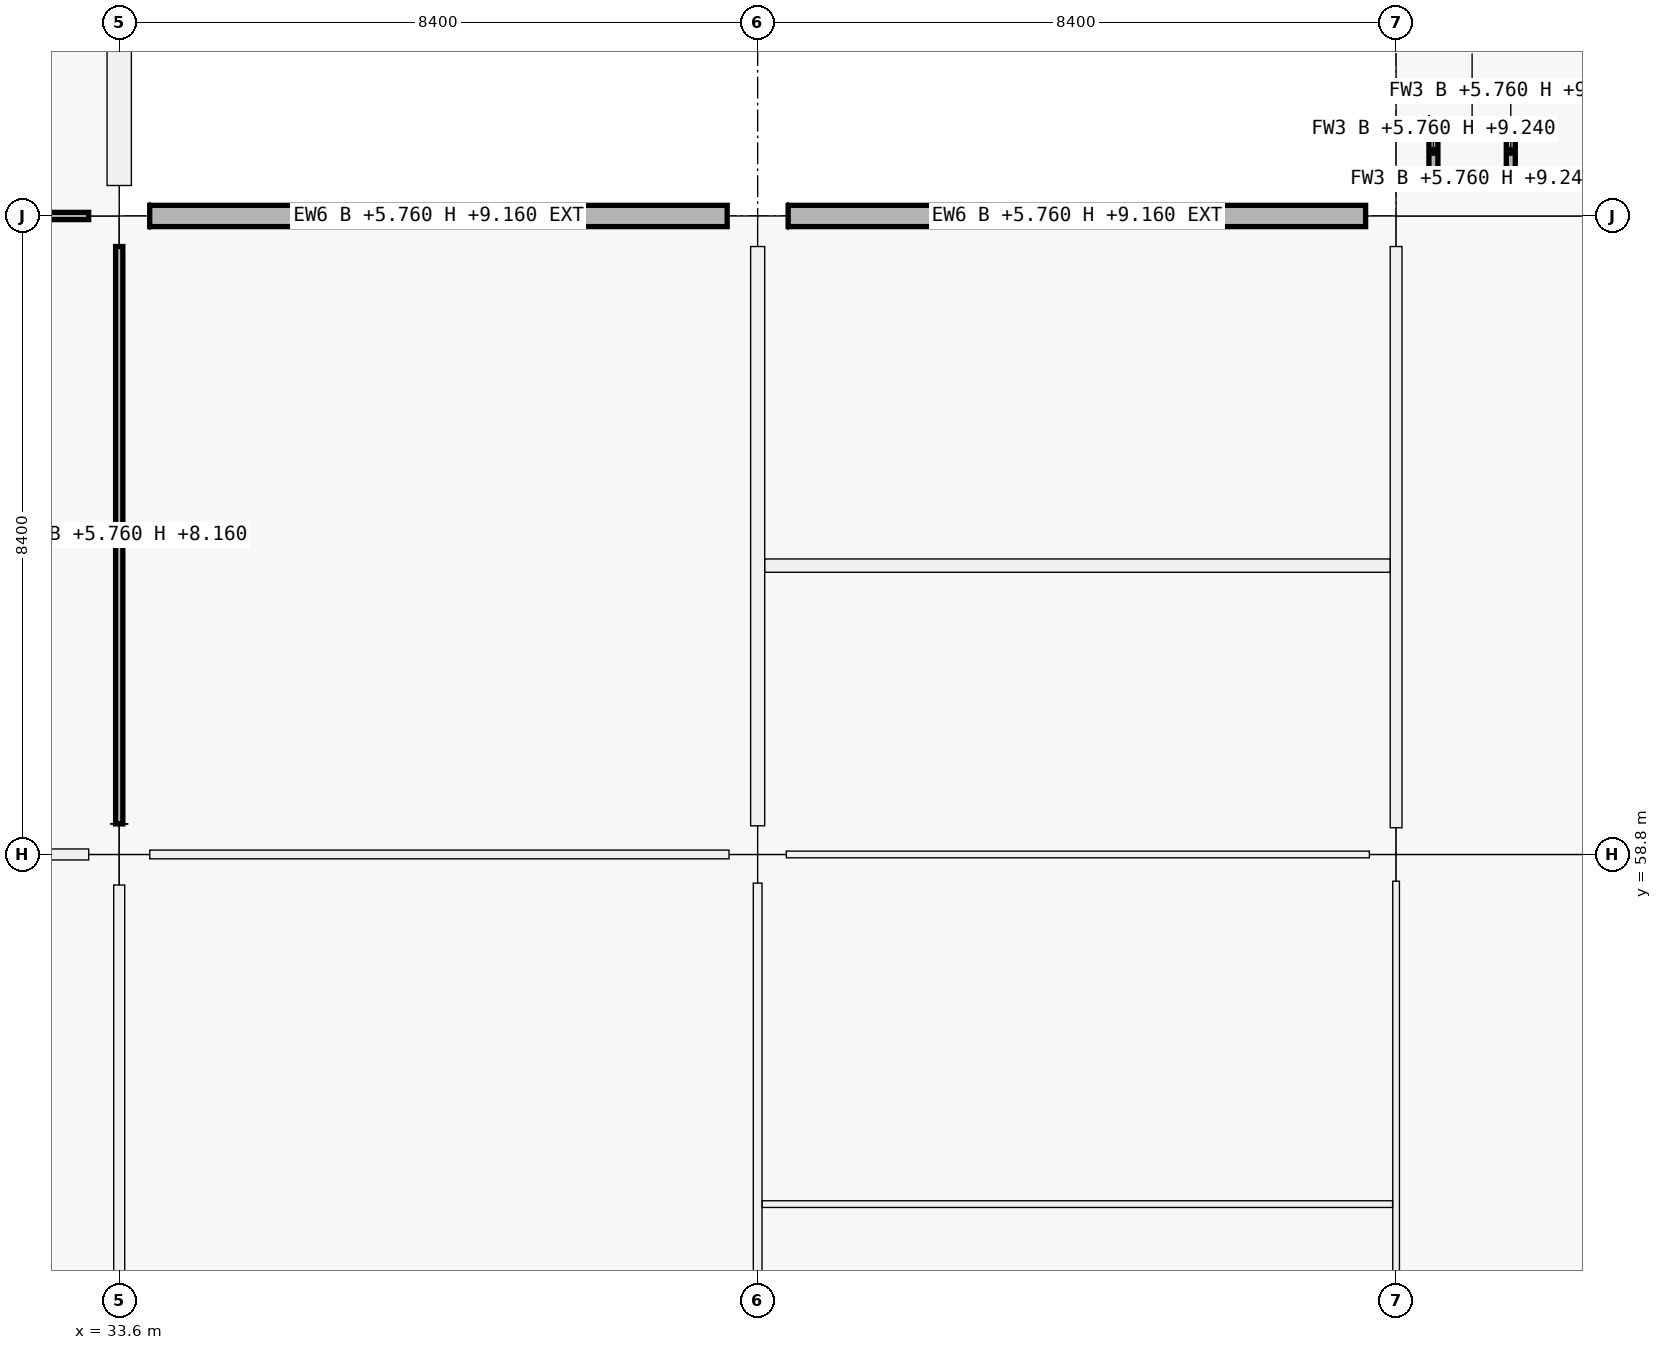
"""IFC4 building model, lengths in metres.
Left out: names, types, materials, properties, quantities, classifications, styles, units other than length and angle.
Written with IfcOpenShell. Run it as: python <this file> out.ifc"""

import sys

from ifc_helpers import new_model, si_unit, direction, frame, frame_2d, origin, origin_2d, place, context, subcontext, project, spatial, rectangle, extrude, element, fill, save


model = new_model("IFC4")
c1 = context("Model", 3, precision=1e-05, world=origin(), true_north=direction((0.0, 1.0)))
c2 = subcontext(c1, "Body", "Model", "MODEL_VIEW")
j1 = project(units=[si_unit("LENGTHUNIT", "METRE"), si_unit("PLANEANGLEUNIT", "RADIAN")], contexts=[c1])
p1 = place(None, origin())
s1 = spatial("IfcSite", under=j1, at=p1, CompositionType="ELEMENT")
p2 = place(p1, origin())
s2 = spatial("IfcBuilding", under=s1, at=p2, CompositionType="ELEMENT")
p3 = place(p2, frame((0.0, 0.0, 5.76)))
s3 = spatial("IfcBuildingStorey", under=s2, at=p3, CompositionType="ELEMENT", Elevation=5.76)
for number, where, z_axis, x_axis in (
    (1, (33.6, 58.8, 0.0), (0.0, 0.0, 1.0), (1.0, 0.0, 0.0)),
    (2, (33.6, 67.2, 0.0), (0.0, 0.0, 1.0), (1.0, 0.0, 0.0)),
):
    element("IfcColumn", number, at=place(p3, frame(where, z_axis=z_axis, x_axis=x_axis)), inside=s3, PredefinedType="COLUMN", context=c2, shape_type="SweptSolid", body=[
        extrude(rectangle(XDim=0.8, YDim=0.8, at=origin_2d()), origin(), (0.0, 0.0, 1.0), 4.5),
    ])
p4 = place(p3, frame((42.0, 58.8, 0.0), z_axis=(0.0, 0.0, 1.0), x_axis=(1.0, 0.0, 0.0)))
e3 = element("IfcColumn", 3, at=p4, inside=s3, PredefinedType="COLUMN", context=c2, shape_type="SweptSolid", body=[
    extrude(rectangle(XDim=0.75, YDim=0.75, at=origin_2d()), origin(), (0.0, 0.0, 1.0), 4.5),
])
p5 = place(p3, frame((42.0, 67.2, 0.0), z_axis=(0.0, 0.0, 1.0), x_axis=(1.0, 0.0, 0.0)))
e4 = element("IfcColumn", 4, at=p5, inside=s3, PredefinedType="COLUMN", context=c2, shape_type="SweptSolid", body=[
    extrude(rectangle(XDim=0.8, YDim=0.8, at=origin_2d()), origin(), (0.0, 0.0, 1.0), 4.5),
])
p6 = place(p3, frame((50.4, 58.8, 0.0), z_axis=(0.0, 0.0, 1.0), x_axis=(1.0, 0.0, 0.0)))
e5 = element("IfcColumn", 5, at=p6, inside=s3, PredefinedType="COLUMN", context=c2, shape_type="SweptSolid", body=[
    extrude(rectangle(XDim=0.7, YDim=0.7, at=origin_2d()), origin(), (0.0, 0.0, 1.0), 4.5),
])
p7 = place(p3, frame((50.4, 67.2, 0.0), z_axis=(0.0, 0.0, 1.0), x_axis=(1.0, 0.0, 0.0)))
e6 = element("IfcColumn", 6, at=p7, inside=s3, PredefinedType="COLUMN", context=c2, shape_type="SweptSolid", body=[
    extrude(rectangle(XDim=0.8, YDim=0.8, at=origin_2d()), origin(), (0.0, 0.0, 1.0), 4.5),
])
p8 = place(p3, frame((33.6, 75.199, 0.0), z_axis=(0.0, 0.0, 1.0), x_axis=(0.0, -1.0, 0.0)))
e7 = element("IfcWall", 7, at=p8, inside=s3, PredefinedType="SOLIDWALL", context=c2, shape_type="SweptSolid", body=[
    extrude(rectangle(XDim=7.598, YDim=0.32, at=frame_2d((3.799, 0.0))), origin(), (0.0, 0.0, 1.0), 3.4),
])
p9 = place(p8, frame((2.524, 0.0, 0.9)))
e8 = element("IfcOpeningElement", 8, at=p9, cuts=e7, PredefinedType="OPENING", context=c2, shape_type="SweptSolid", body=[
    extrude(rectangle(XDim=2.55, YDim=1.95, at=frame_2d((1.275, 0.975))), frame((0.0, 0.16, 0.0), z_axis=(0.0, -1.0, 0.0), x_axis=(1.0, 0.0, 0.0)), (0.0, 0.0, 1.0), 0.32),
])
p10 = place(p3, frame((34.001, 67.2, 0.0), z_axis=(0.0, 0.0, 1.0), x_axis=(1.0, 0.0, 0.0)))
e9 = element("IfcWall", 9, at=p10, inside=s3, PredefinedType="SOLIDWALL", context=c2, shape_type="SweptSolid", body=[
    extrude(rectangle(XDim=7.598, YDim=0.28, at=frame_2d((3.799, 0.0))), origin(), (0.0, 0.0, 1.0), 3.4),
])
p11 = place(p10, frame((3.149, 0.0, 0.9)))
e10 = element("IfcOpeningElement", 10, at=p11, cuts=e9, PredefinedType="OPENING", context=c2, shape_type="SweptSolid", body=[
    extrude(rectangle(XDim=1.3, YDim=1.95, at=frame_2d((0.65, 0.975))), frame((0.0, 0.14, 0.0), z_axis=(0.0, -1.0, 0.0), x_axis=(1.0, 0.0, 0.0)), (0.0, 0.0, 1.0), 0.28),
])
p12 = place(p3, frame((42.401, 67.2, 0.0), z_axis=(0.0, 0.0, 1.0), x_axis=(1.0, 0.0, 0.0)))
e11 = element("IfcWall", 11, at=p12, inside=s3, PredefinedType="SOLIDWALL", context=c2, shape_type="SweptSolid", body=[
    extrude(rectangle(XDim=7.598, YDim=0.28, at=frame_2d((3.799, 0.0))), origin(), (0.0, 0.0, 1.0), 3.4),
])
p13 = place(p12, frame((3.024, 0.0, 0.9)))
e12 = element("IfcOpeningElement", 12, at=p13, cuts=e11, PredefinedType="OPENING", context=c2, shape_type="SweptSolid", body=[
    extrude(rectangle(XDim=1.55, YDim=1.6, at=frame_2d((0.775, 0.8))), frame((0.0, 0.14, 0.0), z_axis=(0.0, -1.0, 0.0), x_axis=(1.0, 0.0, 0.0)), (0.0, 0.0, 1.0), 0.28),
])
for number, where, z_axis, x_axis in (
    (13, (50.832, 67.691, 0.0), (0.0, 0.0, 1.0), (1.0, 0.0, 0.0)),
    (14, (50.832, 68.409, 0.0), (0.0, 0.0, 1.0), (1.0, 0.0, 0.0)),
):
    element("IfcWall", number, at=place(p3, frame(where, z_axis=z_axis, x_axis=x_axis)), inside=s3, PredefinedType="PARTITIONING", context=c2, shape_type="SweptSolid", body=[
        extrude(rectangle(XDim=1.136, YDim=0.118, at=frame_2d((0.568, 0.0))), origin(), (0.0, 0.0, 1.0), 3.48),
    ])
for number, where, z_axis, x_axis in (
    (15, (50.891, 67.75, 0.0), (0.0, 0.0, 1.0), (0.0, 1.0, 0.0)),
    (16, (51.909, 67.75, 0.0), (0.0, 0.0, 1.0), (0.0, 1.0, 0.0)),
):
    element("IfcWall", number, at=place(p3, frame(where, z_axis=z_axis, x_axis=x_axis)), inside=s3, PredefinedType="PARTITIONING", context=c2, shape_type="SweptSolid", body=[
        extrude(rectangle(XDim=0.6, YDim=0.118, at=frame_2d((0.3, 0.0))), origin(), (0.0, 0.0, 1.0), 3.48),
    ])
p14 = place(p3, frame((25.602, 58.8, 0.0), z_axis=(0.0, 0.0, 1.0), x_axis=(1.0, 0.0, 0.0)))
e17 = element("IfcWall", 17, at=p14, inside=s3, PredefinedType="PARTITIONING", context=c2, shape_type="SweptSolid", body=[
    extrude(rectangle(XDim=7.596, YDim=0.145, at=frame_2d((3.798, 0.0))), origin(), (0.0, 0.0, 1.0), 2.4),
])
p15 = place(p14, frame((3.268, 0.0, 0.0)))
e18 = element("IfcOpeningElement", 18, at=p15, cuts=e17, PredefinedType="OPENING", context=c2, shape_type="SweptSolid", body=[
    extrude(rectangle(XDim=1.06, YDim=2.22, at=frame_2d((0.53, 1.11))), frame((0.0, 0.073, 0.0), z_axis=(0.0, -1.0, 0.0), x_axis=(1.0, 0.0, 0.0)), (0.0, 0.0, 1.0), 0.145),
])
p16 = place(p3, frame((25.602, 67.2, 0.0), z_axis=(0.0, 0.0, 1.0), x_axis=(1.0, 0.0, 0.0)))
e19 = element("IfcWall", 19, at=p16, inside=s3, PredefinedType="PARTITIONING", context=c2, shape_type="SweptSolid", body=[
    extrude(rectangle(XDim=7.596, YDim=0.095, at=frame_2d((3.798, 0.0))), origin(), (0.0, 0.0, 1.0), 2.4),
])
p17 = place(p16, frame((3.258, 0.0, 0.0)))
e20 = element("IfcOpeningElement", 20, at=p17, cuts=e19, PredefinedType="OPENING", context=c2, shape_type="SweptSolid", body=[
    extrude(rectangle(XDim=1.08, YDim=2.22, at=frame_2d((0.54, 1.11))), frame((0.0, 0.047, 0.0), z_axis=(0.0, -1.0, 0.0), x_axis=(1.0, 0.0, 0.0)), (0.0, 0.0, 1.0), 0.095),
])
p18 = place(p3, frame((34.002, 58.8, 0.0), z_axis=(0.0, 0.0, 1.0), x_axis=(1.0, 0.0, 0.0)))
e21 = element("IfcWall", 21, at=p18, inside=s3, PredefinedType="PARTITIONING", context=c2, shape_type="SweptSolid", body=[
    extrude(rectangle(XDim=7.621, YDim=0.115, at=frame_2d((3.811, 0.0))), origin(), (0.0, 0.0, 1.0), 2.4),
])
p19 = place(p18, frame((3.28, 0.0, 0.0)))
e22 = element("IfcOpeningElement", 22, at=p19, cuts=e21, PredefinedType="OPENING", context=c2, shape_type="SweptSolid", body=[
    extrude(rectangle(XDim=1.06, YDim=2.22, at=frame_2d((0.53, 1.11))), frame((0.0, 0.058, 0.0), z_axis=(0.0, -1.0, 0.0), x_axis=(1.0, 0.0, 0.0)), (0.0, 0.0, 1.0), 0.115),
])
p20 = place(p3, frame((42.377, 58.8, 0.0), z_axis=(0.0, 0.0, 1.0), x_axis=(1.0, 0.0, 0.0)))
e23 = element("IfcWall", 23, at=p20, inside=s3, PredefinedType="PARTITIONING", context=c2, shape_type="SweptSolid", body=[
    extrude(rectangle(XDim=7.671, YDim=0.088, at=frame_2d((3.835, 0.0))), origin(), (0.0, 0.0, 1.0), 2.4),
])
p21 = place(p3, frame((33.6, 50.802, 0.0), z_axis=(0.0, 0.0, 1.0), x_axis=(0.0, 1.0, 0.0)))
e24 = element("IfcWall", 24, at=p21, inside=s3, PredefinedType="PARTITIONING", context=c2, shape_type="SweptSolid", body=[
    extrude(rectangle(XDim=7.596, YDim=0.145, at=frame_2d((3.798, 0.0))), origin(), (0.0, 0.0, 1.0), 2.4),
])
p22 = place(p21, frame((3.318, 0.0, 0.0)))
e25 = element("IfcOpeningElement", 25, at=p22, cuts=e24, PredefinedType="OPENING", context=c2, shape_type="SweptSolid", body=[
    extrude(rectangle(XDim=0.96, YDim=2.18, at=frame_2d((0.48, 1.09))), frame((0.0, 0.073, 0.0), z_axis=(0.0, -1.0, 0.0), x_axis=(1.0, 0.0, 0.0)), (0.0, 0.0, 1.0), 0.145),
])
p23 = place(p3, frame((33.6, 59.202, 0.0), z_axis=(0.0, 0.0, 1.0), x_axis=(0.0, 1.0, 0.0)))
e26 = element("IfcWall", 26, at=p23, inside=s3, PredefinedType="PARTITIONING", context=c2, shape_type="SweptSolid", body=[
    extrude(rectangle(XDim=7.596, YDim=0.095, at=frame_2d((3.798, 0.0))), origin(), (0.0, 0.0, 1.0), 2.4),
])
p24 = place(p23, frame((3.308, 0.0, 0.0)))
e27 = element("IfcOpeningElement", 27, at=p24, cuts=e26, PredefinedType="OPENING", context=c2, shape_type="SweptSolid", body=[
    extrude(rectangle(XDim=0.98, YDim=2.18, at=frame_2d((0.49, 1.09))), frame((0.0, 0.047, 0.0), z_axis=(0.0, -1.0, 0.0), x_axis=(1.0, 0.0, 0.0)), (0.0, 0.0, 1.0), 0.095),
])
p25 = place(p3, frame((42.0, 50.752, 0.0), z_axis=(0.0, 0.0, 1.0), x_axis=(0.0, 1.0, 0.0)))
e28 = element("IfcWall", 28, at=p25, inside=s3, PredefinedType="PARTITIONING", context=c2, shape_type="SweptSolid", body=[
    extrude(rectangle(XDim=7.671, YDim=0.115, at=frame_2d((3.835, 0.0))), origin(), (0.0, 0.0, 1.0), 2.4),
])
p26 = place(p3, frame((42.0, 59.177, 0.0), z_axis=(0.0, 0.0, 1.0), x_axis=(0.0, 1.0, 0.0)))
e29 = element("IfcWall", 29, at=p26, inside=s3, PredefinedType="PARTITIONING", context=c2, shape_type="SweptSolid", body=[
    extrude(rectangle(XDim=7.621, YDim=0.185, at=frame_2d((3.811, 0.0))), origin(), (0.0, 0.0, 1.0), 2.4),
])
p27 = place(p3, frame((50.4, 50.777, 0.0), z_axis=(0.0, 0.0, 1.0), x_axis=(0.0, 1.0, 0.0)))
e30 = element("IfcWall", 30, at=p27, inside=s3, PredefinedType="PARTITIONING", context=c2, shape_type="SweptSolid", body=[
    extrude(rectangle(XDim=7.671, YDim=0.088, at=frame_2d((3.835, 0.0))), origin(), (0.0, 0.0, 1.0), 2.4),
])
p28 = place(p27, frame((1.193, 0.0, 0.0)))
e31 = element("IfcOpeningElement", 31, at=p28, cuts=e30, PredefinedType="OPENING", context=c2, shape_type="SweptSolid", body=[
    extrude(rectangle(XDim=0.94, YDim=2.15, at=frame_2d((0.47, 1.075))), frame((0.0, 0.044, 0.0), z_axis=(0.0, -1.0, 0.0), x_axis=(1.0, 0.0, 0.0)), (0.0, 0.0, 1.0), 0.088),
])
p29 = place(p27, frame((5.123, 0.0, 0.0)))
e32 = element("IfcOpeningElement", 32, at=p29, cuts=e30, PredefinedType="OPENING", context=c2, shape_type="SweptSolid", body=[
    extrude(rectangle(XDim=0.92, YDim=2.15, at=frame_2d((0.46, 1.075))), frame((0.0, 0.044, 0.0), z_axis=(0.0, -1.0, 0.0), x_axis=(1.0, 0.0, 0.0)), (0.0, 0.0, 1.0), 0.088),
])
p30 = place(p3, frame((50.4, 59.152, 0.0), z_axis=(0.0, 0.0, 1.0), x_axis=(0.0, 1.0, 0.0)))
e33 = element("IfcWall", 33, at=p30, inside=s3, PredefinedType="PARTITIONING", context=c2, shape_type="SweptSolid", body=[
    extrude(rectangle(XDim=7.646, YDim=0.155, at=frame_2d((3.823, 0.0))), origin(), (0.0, 0.0, 1.0), 2.4),
])
p31 = place(p30, frame((1.163, 0.0, 0.0)))
e34 = element("IfcOpeningElement", 34, at=p31, cuts=e33, PredefinedType="OPENING", context=c2, shape_type="SweptSolid", body=[
    extrude(rectangle(XDim=1.05, YDim=2.12, at=frame_2d((0.525, 1.06))), frame((0.0, 0.078, 0.0), z_axis=(0.0, -1.0, 0.0), x_axis=(1.0, 0.0, 0.0)), (0.0, 0.0, 1.0), 0.155),
])
p32 = place(p30, frame((5.103, 0.0, 0.0)))
e35 = element("IfcOpeningElement", 35, at=p32, cuts=e33, PredefinedType="OPENING", context=c2, shape_type="SweptSolid", body=[
    extrude(rectangle(XDim=1.01, YDim=2.12, at=frame_2d((0.505, 1.06))), frame((0.0, 0.078, 0.0), z_axis=(0.0, -1.0, 0.0), x_axis=(1.0, 0.0, 0.0)), (0.0, 0.0, 1.0), 0.155),
])
p33 = place(p3, frame((42.06, 54.2, 0.0), z_axis=(0.0, 0.0, 1.0), x_axis=(1.0, 0.0, 0.0)))
e36 = element("IfcWall", 36, at=p33, inside=s3, PredefinedType="PARTITIONING", context=c2, shape_type="SweptSolid", body=[
    extrude(rectangle(XDim=8.294, YDim=0.088, at=frame_2d((4.147, 0.0))), origin(), (0.0, 0.0, 1.0), 2.4),
])
p34 = place(p3, frame((42.094, 62.6, 0.0), z_axis=(0.0, 0.0, 1.0), x_axis=(1.0, 0.0, 0.0)))
e37 = element("IfcWall", 37, at=p34, inside=s3, PredefinedType="PARTITIONING", context=c2, shape_type="SweptSolid", body=[
    extrude(rectangle(XDim=8.226, YDim=0.175, at=frame_2d((4.113, 0.0))), origin(), (0.0, 0.0, 1.0), 2.4),
])
p35 = place(p11, origin())
e38 = element("IfcWindow", 38, at=p35, inside=s3, PartitioningType="SINGLE_PANEL", PredefinedType="WINDOW", context=c2, shape_type="SweptSolid", body=[
    extrude(rectangle(XDim=1.3, YDim=1.95, at=frame_2d((0.65, 0.975))), frame((0.0, 0.03, 0.0), z_axis=(0.0, -1.0, 0.0), x_axis=(1.0, 0.0, 0.0)), (0.0, 0.0, 1.0), 0.06),
])
fill(e10, e38)
p36 = place(p13, origin())
e39 = element("IfcWindow", 39, at=p36, inside=s3, PartitioningType="SINGLE_PANEL", PredefinedType="WINDOW", context=c2, shape_type="SweptSolid", body=[
    extrude(rectangle(XDim=1.55, YDim=1.6, at=frame_2d((0.775, 0.8))), frame((0.0, 0.03, 0.0), z_axis=(0.0, -1.0, 0.0), x_axis=(1.0, 0.0, 0.0)), (0.0, 0.0, 1.0), 0.06),
])
fill(e12, e39)
p37 = place(p29, origin())
e40 = element("IfcDoor", 40, at=p37, inside=s3, OperationType="SINGLE_SWING_LEFT", PredefinedType="DOOR", context=c2, shape_type="SweptSolid", body=[
    extrude(rectangle(XDim=0.92, YDim=2.15, at=frame_2d((0.46, 1.075))), frame((0.0, 0.025, 0.0), z_axis=(0.0, -1.0, 0.0), x_axis=(1.0, 0.0, 0.0)), (0.0, 0.0, 1.0), 0.05),
])
fill(e32, e40)
p38 = place(p31, origin())
e41 = element("IfcDoor", 41, at=p38, inside=s3, OperationType="SINGLE_SWING_RIGHT", PredefinedType="DOOR", context=c2, shape_type="SweptSolid", body=[
    extrude(rectangle(XDim=1.05, YDim=2.12, at=frame_2d((0.525, 1.06))), frame((0.0, 0.025, 0.0), z_axis=(0.0, -1.0, 0.0), x_axis=(1.0, 0.0, 0.0)), (0.0, 0.0, 1.0), 0.05),
])
fill(e34, e41)
p39 = place(p32, origin())
e42 = element("IfcDoor", 42, at=p39, inside=s3, OperationType="SINGLE_SWING_LEFT", PredefinedType="DOOR", context=c2, shape_type="SweptSolid", body=[
    extrude(rectangle(XDim=1.01, YDim=2.12, at=frame_2d((0.505, 1.06))), frame((0.0, 0.025, 0.0), z_axis=(0.0, -1.0, 0.0), x_axis=(1.0, 0.0, 0.0)), (0.0, 0.0, 1.0), 0.05),
])
fill(e35, e42)
p40 = place(p19, origin())
e43 = element("IfcDoor", 43, at=p40, inside=s3, OperationType="SINGLE_SWING_LEFT", PredefinedType="DOOR", context=c2, shape_type="SweptSolid", body=[
    extrude(rectangle(XDim=1.06, YDim=2.22, at=frame_2d((0.53, 1.11))), frame((0.0, 0.025, 0.0), z_axis=(0.0, -1.0, 0.0), x_axis=(1.0, 0.0, 0.0)), (0.0, 0.0, 1.0), 0.05),
])
fill(e22, e43)
p41 = place(p22, origin())
e44 = element("IfcDoor", 44, at=p41, inside=s3, OperationType="SINGLE_SWING_RIGHT", PredefinedType="DOOR", context=c2, shape_type="SweptSolid", body=[
    extrude(rectangle(XDim=0.96, YDim=2.18, at=frame_2d((0.48, 1.09))), frame((0.0, 0.025, 0.0), z_axis=(0.0, -1.0, 0.0), x_axis=(1.0, 0.0, 0.0)), (0.0, 0.0, 1.0), 0.05),
])
fill(e25, e44)
p42 = place(p24, origin())
e45 = element("IfcDoor", 45, at=p42, inside=s3, OperationType="SINGLE_SWING_LEFT", PredefinedType="DOOR", context=c2, shape_type="SweptSolid", body=[
    extrude(rectangle(XDim=0.98, YDim=2.18, at=frame_2d((0.49, 1.09))), frame((0.0, 0.025, 0.0), z_axis=(0.0, -1.0, 0.0), x_axis=(1.0, 0.0, 0.0)), (0.0, 0.0, 1.0), 0.05),
])
fill(e27, e45)
save(model, sys.argv[1])
